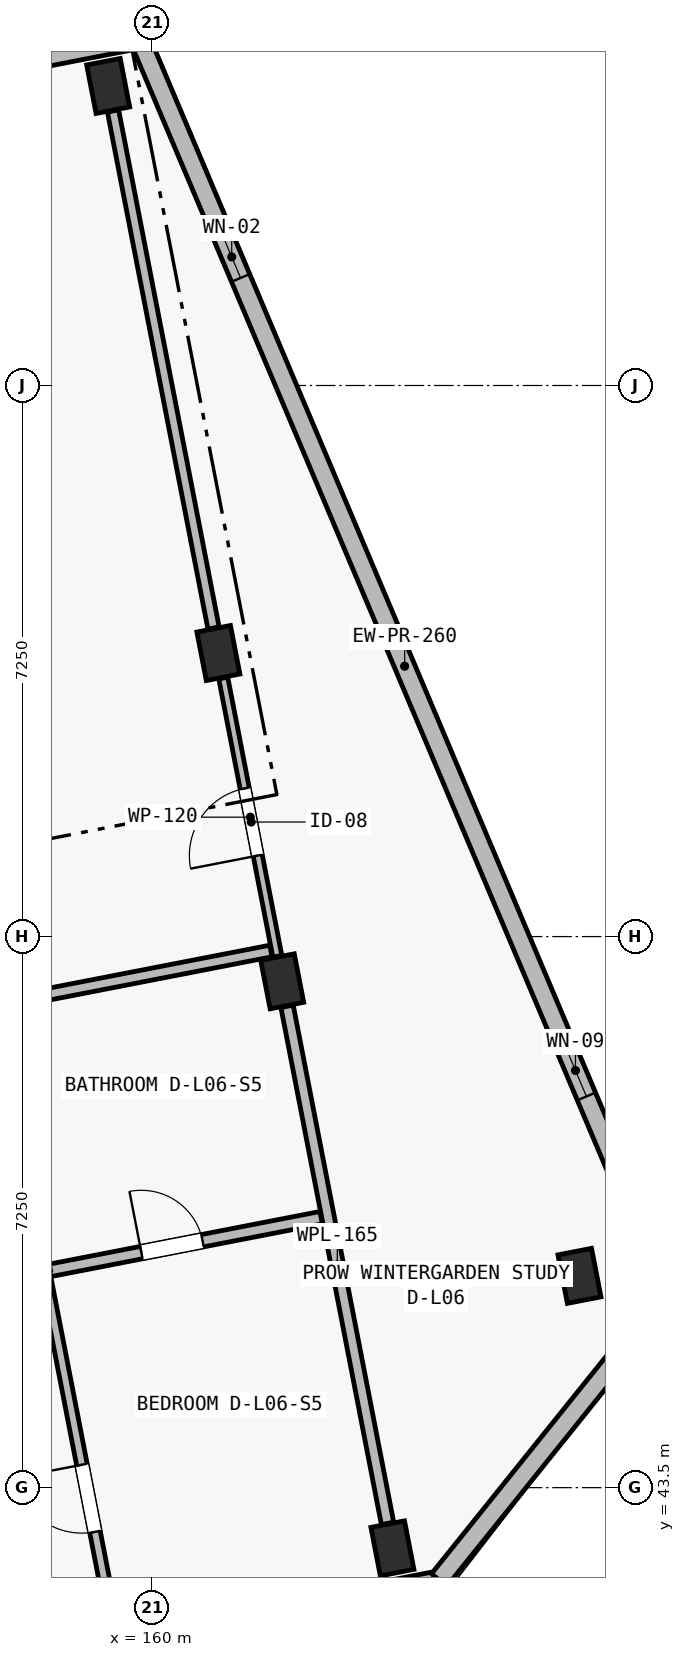
"""IFC4 building model, lengths in metres.
Left out: names, types, materials, properties, quantities, classifications, styles, units other than length and angle.
Written with IfcOpenShell. Run it as: python <this file> out.ifc"""

import sys

from ifc_helpers import new_model, si_unit, direction, frame, frame_2d, origin, origin_2d, place, context, subcontext, project, spatial, rectangle, extrude, element, fill, save


model = new_model("IFC4")
c1 = context("Model", 3, precision=1e-05, world=origin(), true_north=direction((0.0, 1.0)))
c2 = subcontext(c1, "Body", "Model", "MODEL_VIEW")
j1 = project(units=[si_unit("LENGTHUNIT", "METRE"), si_unit("PLANEANGLEUNIT", "RADIAN")], contexts=[c1])
p1 = place(None, origin())
s1 = spatial("IfcSite", under=j1, at=p1, CompositionType="ELEMENT")
p2 = place(p1, origin())
s2 = spatial("IfcBuilding", under=s1, at=p2, CompositionType="ELEMENT")
p3 = place(p2, frame((0.0, 0.0, 21.4)))
s3 = spatial("IfcBuildingStorey", under=s2, at=p3, CompositionType="ELEMENT", Elevation=21.4)
for number, where, z_axis, x_axis in (
    (1, (163.162, 42.701, 0.0), (0.0, 0.0, 1.0), (0.982, 0.191, 0.0)),
    (2, (161.712, 50.161, 0.0), (0.0, 0.0, 1.0), (0.982, 0.191, 0.0)),
    (3, (160.873, 54.48, 0.0), (0.0, 0.0, 1.0), (0.982, 0.191, 0.0)),
    (4, (159.422, 61.941, 0.0), (0.0, 0.0, 1.0), (0.982, 0.191, 0.0)),
    (5, (165.623, 46.286, 0.0), (0.0, 0.0, 1.0), (0.982, 0.191, 0.0)),
):
    element("IfcColumn", number, at=place(p3, frame(where, z_axis=z_axis, x_axis=x_axis)), inside=s3, PredefinedType="COLUMN", context=c2, shape_type="SweptSolid", body=[
        extrude(rectangle(XDim=0.45, YDim=0.65, at=origin_2d()), origin(), (0.0, 0.0, 1.0), 3.25),
    ])
p4 = place(p3, frame((163.778, 42.286, 0.0), z_axis=(0.0, 0.0, 1.0), x_axis=(-0.981628367112, -0.190802905848, 0.0)))
e6 = element("IfcWall", 6, at=p4, inside=s3, PredefinedType="SOLIDWALL", context=c2, shape_type="SweptSolid", body=[
    extrude(rectangle(XDim=8.125, YDim=0.24, at=frame_2d((4.062, 0.0))), origin(), (0.0, 0.0, 1.0), 3.0),
])
p5 = place(p4, frame((2.454, 0.0, 0.52)))
e7 = element("IfcOpeningElement", 7, at=p5, cuts=e6, PredefinedType="OPENING", context=c2, shape_type="SweptSolid", body=[
    extrude(rectangle(XDim=0.58, YDim=2.16, at=frame_2d((0.29, 1.08))), frame((0.0, 0.135, 0.0), z_axis=(0.0, -1.0, 0.0), x_axis=(1.0, 0.0, 0.0)), (0.0, 0.0, 1.0), 0.27),
])
p6 = place(p4, frame((5.605, 0.0, 0.52)))
e8 = element("IfcOpeningElement", 8, at=p6, cuts=e6, PredefinedType="OPENING", context=c2, shape_type="SweptSolid", body=[
    extrude(rectangle(XDim=0.64, YDim=2.18, at=frame_2d((0.32, 1.09))), frame((0.0, 0.135, 0.0), z_axis=(0.0, -1.0, 0.0), x_axis=(1.0, 0.0, 0.0)), (0.0, 0.0, 1.0), 0.27),
])
p7 = place(p3, frame((151.862, 61.006, 0.0), z_axis=(0.0, 0.0, 1.0), x_axis=(0.981627273155, 0.190808533872, 0.0)))
e9 = element("IfcWall", 9, at=p7, inside=s3, PredefinedType="SOLIDWALL", context=c2, shape_type="SweptSolid", body=[
    extrude(rectangle(XDim=8.125, YDim=0.24, at=frame_2d((4.062, 0.0))), origin(), (0.0, 0.0, 1.0), 3.0),
])
p8 = place(p3, frame((159.837, 62.556, 0.0), z_axis=(0.0, 0.0, 1.0), x_axis=(0.389225507936, -0.921142499276, 0.0)))
e10 = element("IfcWall", 10, at=p8, inside=s3, PredefinedType="SOLIDWALL", context=c2, shape_type="SweptSolid", body=[
    extrude(rectangle(XDim=17.91, YDim=0.26, at=frame_2d((8.955, 0.0))), origin(), (0.0, 0.0, 1.0), 3.0),
])
p9 = place(p8, frame((2.81, 0.0, 0.45)))
e11 = element("IfcOpeningElement", 11, at=p9, cuts=e10, PredefinedType="OPENING", context=c2, shape_type="SweptSolid", body=[
    extrude(rectangle(XDim=0.6, YDim=2.22, at=frame_2d((0.3, 1.11))), frame((0.0, 0.145, 0.0), z_axis=(0.0, -1.0, 0.0), x_axis=(1.0, 0.0, 0.0)), (0.0, 0.0, 1.0), 0.29),
])
p10 = place(p8, frame((14.36, 0.0, 0.52)))
e12 = element("IfcOpeningElement", 12, at=p10, cuts=e10, PredefinedType="OPENING", context=c2, shape_type="SweptSolid", body=[
    extrude(rectangle(XDim=0.74, YDim=2.26, at=frame_2d((0.37, 1.13))), frame((0.0, 0.145, 0.0), z_axis=(0.0, -1.0, 0.0), x_axis=(1.0, 0.0, 0.0)), (0.0, 0.0, 1.0), 0.29),
])
p11 = place(p3, frame((166.809, 46.058, 0.0), z_axis=(0.0, 0.0, 1.0), x_axis=(-0.626281072923, -0.779597343312, 0.0)))
e13 = element("IfcWall", 13, at=p11, inside=s3, PredefinedType="SOLIDWALL", context=c2, shape_type="SweptSolid", body=[
    extrude(rectangle(XDim=4.839, YDim=0.26, at=frame_2d((2.42, 0.0))), origin(), (0.0, 0.0, 1.0), 3.0),
])
p12 = place(p3, frame((161.648, 50.49, 0.0), z_axis=(0.0, 0.0, 1.0), x_axis=(-0.190789073686, 0.981631055622, 0.0)))
e14 = element("IfcWall", 14, at=p12, inside=s3, PredefinedType="PARTITIONING", context=c2, shape_type="SweptSolid", body=[
    extrude(rectangle(XDim=3.73, YDim=0.12, at=frame_2d((1.865, 0.0))), origin(), (0.0, 0.0, 1.0), 2.5),
])
p13 = place(p12, frame((1.35, 0.0, 0.0)))
e15 = element("IfcOpeningElement", 15, at=p13, cuts=e14, PredefinedType="OPENING", context=c2, shape_type="SweptSolid", body=[
    extrude(rectangle(XDim=0.9, YDim=2.1, at=frame_2d((0.45, 1.05))), frame((0.0, 0.075, 0.0), z_axis=(0.0, -1.0, 0.0), x_axis=(1.0, 0.0, 0.0)), (0.0, 0.0, 1.0), 0.15),
])
p14 = place(p3, frame((160.809, 54.809, 0.0), z_axis=(0.0, 0.0, 1.0), x_axis=(-0.190808365525, 0.981627305878, 0.0)))
e16 = element("IfcWall", 16, at=p14, inside=s3, PredefinedType="PARTITIONING", context=c2, shape_type="SweptSolid", body=[
    extrude(rectangle(XDim=6.93, YDim=0.15, at=frame_2d((3.465, 0.0))), origin(), (0.0, 0.0, 1.0), 2.5),
])
p15 = place(p3, frame((163.098, 43.03, 0.0), z_axis=(0.0, 0.0, 1.0), x_axis=(-0.190835713385, 0.981621989616, 0.0)))
e17 = element("IfcWall", 17, at=p15, inside=s3, PredefinedType="PLUMBINGWALL", context=c2, shape_type="SweptSolid", body=[
    extrude(rectangle(XDim=6.93, YDim=0.165, at=frame_2d((3.465, 0.0))), origin(), (0.0, 0.0, 1.0), 2.5),
])
p16 = place(p3, frame((154.402, 49.168, 0.0), z_axis=(0.0, 0.0, 1.0), x_axis=(0.981623226858, 0.190829349137, 0.0)))
e18 = element("IfcWall", 18, at=p16, inside=s3, PredefinedType="PARTITIONING", context=c2, shape_type="SweptSolid", body=[
    extrude(rectangle(XDim=7.295, YDim=0.155, at=frame_2d((3.647, 0.0))), origin(), (0.0, 0.0, 1.0), 2.97),
])
p17 = place(p16, frame((1.355, 0.0, 0.0)))
e19 = element("IfcOpeningElement", 19, at=p17, cuts=e18, PredefinedType="OPENING", context=c2, shape_type="SweptSolid", body=[
    extrude(rectangle(XDim=0.98, YDim=2.15, at=frame_2d((0.49, 1.075))), frame((0.0, 0.093, 0.0), z_axis=(0.0, -1.0, 0.0), x_axis=(1.0, 0.0, 0.0)), (0.0, 0.0, 1.0), 0.185),
])
p18 = place(p3, frame((158.583, 46.344, 0.0), z_axis=(0.0, 0.0, 1.0), x_axis=(0.981621896267, 0.190836193549, 0.0)))
e20 = element("IfcWall", 20, at=p18, inside=s3, PredefinedType="PLUMBINGWALL", context=c2, shape_type="SweptSolid", body=[
    extrude(rectangle(XDim=3.71, YDim=0.165, at=frame_2d((1.855, 0.0))), origin(), (0.0, 0.0, 1.0), 2.97),
])
p19 = place(p18, frame((1.3, 0.0, 0.0)))
e21 = element("IfcOpeningElement", 21, at=p19, cuts=e20, PredefinedType="OPENING", context=c2, shape_type="SweptSolid", body=[
    extrude(rectangle(XDim=0.82, YDim=2.08, at=frame_2d((0.41, 1.04))), frame((0.0, 0.097, 0.0), z_axis=(0.0, -1.0, 0.0), x_axis=(1.0, 0.0, 0.0)), (0.0, 0.0, 1.0), 0.195),
])
p20 = place(p3, frame((159.506, 41.593, 0.0), z_axis=(0.0, 0.0, 1.0), x_axis=(-0.190777847092, 0.981633237548, 0.0)))
e22 = element("IfcWall", 22, at=p20, inside=s3, PredefinedType="PARTITIONING", context=c2, shape_type="SweptSolid", body=[
    extrude(rectangle(XDim=4.84, YDim=0.14, at=frame_2d((2.42, 0.0))), origin(), (0.0, 0.0, 1.0), 2.97),
])
p21 = place(p20, frame((1.35, 0.0, 0.0)))
e23 = element("IfcOpeningElement", 23, at=p21, cuts=e22, PredefinedType="OPENING", context=c2, shape_type="SweptSolid", body=[
    extrude(rectangle(XDim=0.9, YDim=2.1, at=frame_2d((0.45, 1.05))), frame((0.0, 0.085, 0.0), z_axis=(0.0, -1.0, 0.0), x_axis=(1.0, 0.0, 0.0)), (0.0, 0.0, 1.0), 0.17),
])
p22 = place(p9, origin())
e24 = element("IfcWindow", 24, at=p22, inside=s3, PartitioningType="SINGLE_PANEL", PredefinedType="WINDOW", context=c2, shape_type="SweptSolid", body=[
    extrude(rectangle(XDim=0.6, YDim=2.22, at=frame_2d((0.3, 1.11))), frame((0.0, 0.03, 0.0), z_axis=(0.0, -1.0, 0.0), x_axis=(1.0, 0.0, 0.0)), (0.0, 0.0, 1.0), 0.06),
])
fill(e11, e24)
p23 = place(p10, origin())
e25 = element("IfcWindow", 25, at=p23, inside=s3, PartitioningType="SINGLE_PANEL", PredefinedType="WINDOW", context=c2, shape_type="SweptSolid", body=[
    extrude(rectangle(XDim=0.74, YDim=2.26, at=frame_2d((0.37, 1.13))), frame((0.0, 0.03, 0.0), z_axis=(0.0, -1.0, 0.0), x_axis=(1.0, 0.0, 0.0)), (0.0, 0.0, 1.0), 0.06),
])
fill(e12, e25)
p24 = place(p13, origin())
e26 = element("IfcDoor", 26, at=p24, inside=s3, OperationType="SINGLE_SWING_LEFT", PredefinedType="DOOR", context=c2, shape_type="SweptSolid", body=[
    extrude(rectangle(XDim=0.9, YDim=2.1, at=frame_2d((0.45, 1.05))), frame((0.0, 0.025, 0.0), z_axis=(0.0, -1.0, 0.0), x_axis=(1.0, 0.0, 0.0)), (0.0, 0.0, 1.0), 0.05),
])
fill(e15, e26)
p25 = place(p19, origin())
e27 = element("IfcDoor", 27, at=p25, inside=s3, OperationType="SINGLE_SWING_LEFT", PredefinedType="DOOR", context=c2, shape_type="SweptSolid", body=[
    extrude(rectangle(XDim=0.82, YDim=2.08, at=frame_2d((0.41, 1.04))), frame((0.0, 0.025, 0.0), z_axis=(0.0, -1.0, 0.0), x_axis=(1.0, 0.0, 0.0)), (0.0, 0.0, 1.0), 0.05),
])
fill(e21, e27)
p26 = place(p21, origin())
e28 = element("IfcDoor", 28, at=p26, inside=s3, OperationType="SINGLE_SWING_RIGHT", PredefinedType="DOOR", context=c2, shape_type="SweptSolid", body=[
    extrude(rectangle(XDim=0.9, YDim=2.1, at=frame_2d((0.45, 1.05))), frame((0.0, 0.025, 0.0), z_axis=(0.0, -1.0, 0.0), x_axis=(1.0, 0.0, 0.0)), (0.0, 0.0, 1.0), 0.05),
])
fill(e23, e28)
save(model, sys.argv[1])
